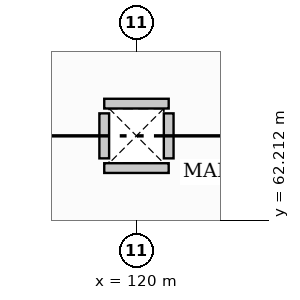
"""IFC4 building model, lengths in metres.
Left out: names, types, materials, properties, quantities, classifications, styles, units other than length and angle.
Written with IfcOpenShell. Run it as: python <this file> out.ifc"""

import sys

from ifc_helpers import new_model, si_unit, direction, frame, frame_2d, origin, place, context, subcontext, project, spatial, rectangle, extrude, element, save


model = new_model("IFC4")
c1 = context("Model", 3, precision=1e-05, world=origin(), true_north=direction((0.0, 1.0)))
c2 = subcontext(c1, "Body", "Model", "MODEL_VIEW")
j1 = project(units=[si_unit("LENGTHUNIT", "METRE"), si_unit("PLANEANGLEUNIT", "RADIAN")], contexts=[c1])
p1 = place(None, origin())
s1 = spatial("IfcSite", under=j1, at=p1, CompositionType="ELEMENT")
p2 = place(p1, origin())
s2 = spatial("IfcBuilding", under=s1, at=p2, CompositionType="ELEMENT")
p3 = place(p2, origin())
s3 = spatial("IfcBuildingStorey", under=s2, at=p3, CompositionType="ELEMENT", Elevation=0.0)
for number, where, z_axis, x_axis in (
    (1, (119.47, 63.07, 0.0), (0.0, 0.0, 1.0), (1.0, 0.0, 0.0)),
    (2, (120.53, 64.13, 0.0), (0.0, 0.0, 1.0), (-1.0, 0.0, 0.0)),
):
    element("IfcWall", number, at=place(p3, frame(where, z_axis=z_axis, x_axis=x_axis)), inside=s3, PredefinedType="PARTITIONING", context=c2, shape_type="SweptSolid", body=[
        extrude(rectangle(XDim=1.06, YDim=0.16, at=frame_2d((0.53, 0.0))), origin(), (0.0, 0.0, 1.0), 3.55),
    ])
for number, where, z_axis, x_axis in (
    (3, (119.47, 63.97, 0.0), (0.0, 0.0, 1.0), (0.0, -1.0, 0.0)),
    (4, (120.53, 63.23, 0.0), (0.0, 0.0, 1.0), (0.0, 1.0, 0.0)),
):
    element("IfcWall", number, at=place(p3, frame(where, z_axis=z_axis, x_axis=x_axis)), inside=s3, PredefinedType="PARTITIONING", context=c2, shape_type="SweptSolid", body=[
        extrude(rectangle(XDim=0.74, YDim=0.16, at=frame_2d((0.37, 0.0))), origin(), (0.0, 0.0, 1.0), 3.55),
    ])
save(model, sys.argv[1])
